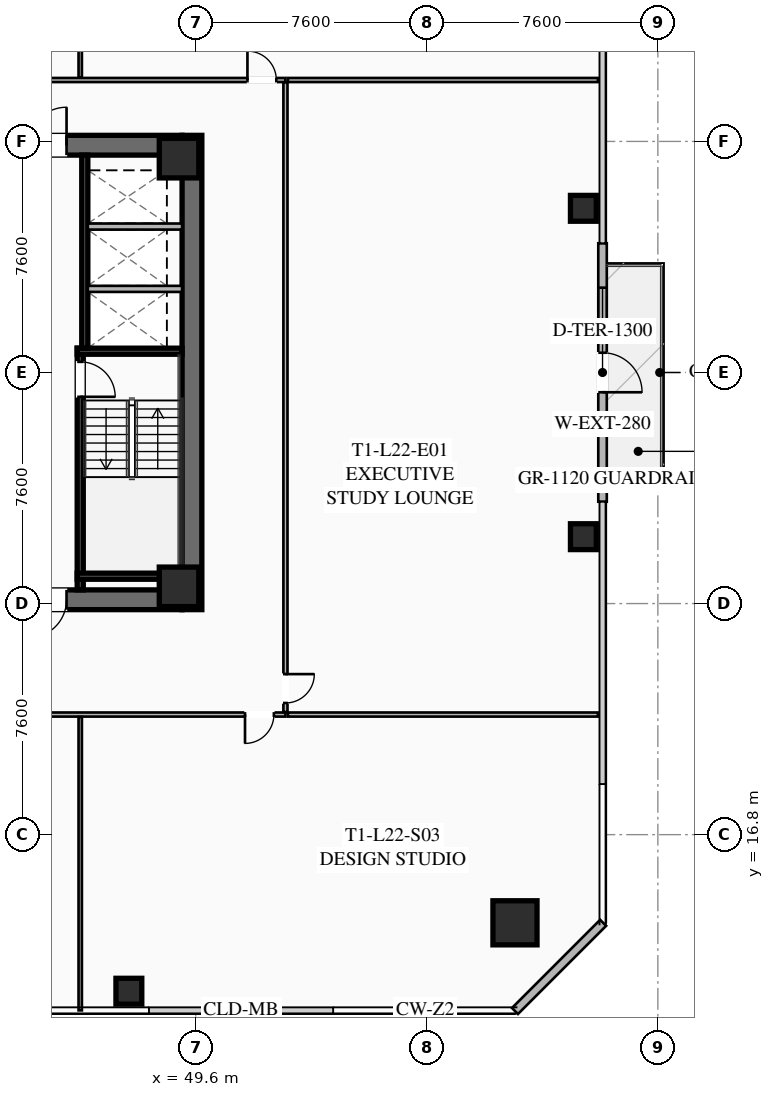
"""IFC4 building model, lengths in metres.
Left out: names, types, materials, properties, quantities, classifications, styles, units other than length and angle.
Written with IfcOpenShell. Run it as: python <this file> out.ifc"""

import sys

from ifc_helpers import new_model, si_unit, direction, frame, frame_2d, origin, origin_2d, place, context, subcontext, project, spatial, rectangle, hollow_rectangle, extrude, element, fill, save


model = new_model("IFC4")
c1 = context("Model", 3, precision=1e-05, world=origin(), true_north=direction((0.0, 1.0)))
c2 = subcontext(c1, "Body", "Model", "MODEL_VIEW")
j1 = project(units=[si_unit("LENGTHUNIT", "METRE"), si_unit("PLANEANGLEUNIT", "RADIAN")], contexts=[c1])
p1 = place(None, origin())
s1 = spatial("IfcSite", under=j1, at=p1, CompositionType="ELEMENT")
p2 = place(p1, origin())
s2 = spatial("IfcBuilding", under=s1, at=p2, CompositionType="ELEMENT")
p3 = place(p2, frame((0.0, 0.0, 84.95)))
s3 = spatial("IfcBuildingStorey", under=s2, at=p3, CompositionType="ELEMENT", Elevation=84.95)
p4 = place(p3, frame((49.475, 39.8, 0.0), z_axis=(0.0, 0.0, 1.0), x_axis=(0.0, -1.0, 0.0)))
e1 = element("IfcWall", 1, at=p4, inside=s3, PredefinedType="SHEAR", context=c2, shape_type="SweptSolid", body=[
    extrude(rectangle(XDim=15.6, YDim=0.65, at=frame_2d((7.8, 0.0))), origin(), (0.0, 0.0, 1.0), 3.55),
])
p5 = place(p3, frame((49.15, 24.525, 0.0), z_axis=(0.0, 0.0, 1.0), x_axis=(-1.0, 0.0, 0.0)))
e2 = element("IfcWall", 2, at=p5, inside=s3, PredefinedType="SHEAR", context=c2, shape_type="SweptSolid", body=[
    extrude(rectangle(XDim=14.3, YDim=0.65, at=frame_2d((7.15, 0.0))), origin(), (0.0, 0.0, 1.0), 3.55),
])
p6 = place(p5, frame((8.85, 0.0, 0.0)))
e3 = element("IfcOpeningElement", 3, at=p6, cuts=e2, PredefinedType="OPENING", context=c2, shape_type="SweptSolid", body=[
    extrude(rectangle(XDim=1.25, YDim=2.25, at=frame_2d((0.625, 1.125))), frame((0.0, 0.335, 0.0), z_axis=(0.0, -1.0, 0.0), x_axis=(1.0, 0.0, 0.0)), (0.0, 0.0, 1.0), 0.67),
])
p7 = place(p5, frame((3.8, 0.0, 0.0)))
e4 = element("IfcOpeningElement", 4, at=p7, cuts=e2, PredefinedType="OPENING", context=c2, shape_type="SweptSolid", body=[
    extrude(rectangle(XDim=1.25, YDim=2.25, at=frame_2d((0.625, 1.125))), frame((0.0, 0.335, 0.0), z_axis=(0.0, -1.0, 0.0), x_axis=(1.0, 0.0, 0.0)), (0.0, 0.0, 1.0), 0.67),
])
p8 = place(p3, frame((34.85, 39.475, 0.0), z_axis=(0.0, 0.0, 1.0), x_axis=(1.0, 0.0, 0.0)))
e5 = element("IfcWall", 5, at=p8, inside=s3, PredefinedType="SHEAR", context=c2, shape_type="SweptSolid", body=[
    extrude(rectangle(XDim=14.3, YDim=0.65, at=frame_2d((7.15, 0.0))), origin(), (0.0, 0.0, 1.0), 3.55),
])
p9 = place(p8, frame((4.2, 0.0, 0.0)))
e6 = element("IfcOpeningElement", 6, at=p9, cuts=e5, PredefinedType="OPENING", context=c2, shape_type="SweptSolid", body=[
    extrude(rectangle(XDim=1.25, YDim=2.25, at=frame_2d((0.625, 1.125))), frame((0.0, 0.335, 0.0), z_axis=(0.0, -1.0, 0.0), x_axis=(1.0, 0.0, 0.0)), (0.0, 0.0, 1.0), 0.67),
])
p10 = place(p8, frame((9.25, 0.0, 0.0)))
e7 = element("IfcOpeningElement", 7, at=p10, cuts=e5, PredefinedType="OPENING", context=c2, shape_type="SweptSolid", body=[
    extrude(rectangle(XDim=1.25, YDim=2.25, at=frame_2d((0.625, 1.125))), frame((0.0, 0.335, 0.0), z_axis=(0.0, -1.0, 0.0), x_axis=(1.0, 0.0, 0.0)), (0.0, 0.0, 1.0), 0.67),
])
for number, where, z_axis, x_axis in (
    (8, (49.05, 24.95, 0.0), (0.0, 0.0, 1.0), (1.0, 0.0, 0.0)),
    (9, (49.05, 39.05, 0.0), (0.0, 0.0, 1.0), (1.0, 0.0, 0.0)),
):
    element("IfcColumn", number, at=place(p3, frame(where, z_axis=z_axis, x_axis=x_axis)), inside=s3, PredefinedType="COLUMN", context=c2, shape_type="SweptSolid", body=[
        extrude(hollow_rectangle(XDim=1.3, YDim=1.3, WallThickness=0.05, at=origin_2d()), origin(), (0.0, 0.0, 1.0), 3.35),
    ])
p11 = place(p3, frame((60.1, 13.9, 0.0), z_axis=(0.0, 0.0, 1.0), x_axis=(1.0, 0.0, 0.0)))
e10 = element("IfcColumn", 10, at=p11, inside=s3, PredefinedType="COLUMN", context=c2, shape_type="SweptSolid", body=[
    extrude(hollow_rectangle(XDim=1.45, YDim=1.45, WallThickness=0.055, at=origin_2d()), origin(), (0.0, 0.0, 1.0), 3.35),
])
for number, where, z_axis, x_axis in (
    (11, (47.4, 11.65, 0.0), (0.0, 0.0, 1.0), (1.0, 0.0, 0.0)),
    (12, (62.35, 26.6, 0.0), (0.0, 0.0, 1.0), (1.0, 0.0, 0.0)),
    (13, (62.35, 37.4, 0.0), (0.0, 0.0, 1.0), (1.0, 0.0, 0.0)),
):
    element("IfcColumn", number, at=place(p3, frame(where, z_axis=z_axis, x_axis=x_axis)), inside=s3, PredefinedType="COLUMN", context=c2, shape_type="SweptSolid", body=[
        extrude(hollow_rectangle(XDim=0.85, YDim=0.85, WallThickness=0.035, at=origin_2d()), origin(), (0.0, 0.0, 1.0), 3.35),
    ])
p12 = place(p3, frame((62.98, 36.25, 0.0), z_axis=(0.0, 0.0, 1.0), x_axis=(0.0, -1.0, 0.0)))
e14 = element("IfcWall", 14, at=p12, inside=s3, PredefinedType="SOLIDWALL", context=c2, shape_type="SweptSolid", body=[
    extrude(rectangle(XDim=8.5, YDim=0.28, at=frame_2d((4.25, 0.0))), origin(), (0.0, 0.0, 1.0), 3.35),
])
p13 = place(p12, frame((3.6, 0.0, 0.0)))
e15 = element("IfcOpeningElement", 15, at=p13, cuts=e14, PredefinedType="OPENING", context=c2, shape_type="SweptSolid", body=[
    extrude(rectangle(XDim=1.3, YDim=2.15, at=frame_2d((0.65, 1.075))), frame((0.0, 0.15, 0.0), z_axis=(0.0, -1.0, 0.0), x_axis=(1.0, 0.0, 0.0)), (0.0, 0.0, 1.0), 0.3),
])
p14 = place(p12, frame((1.46, 0.0, 0.85)))
e16 = element("IfcOpeningElement", 16, at=p14, cuts=e14, PredefinedType="OPENING", context=c2, shape_type="SweptSolid", body=[
    extrude(rectangle(XDim=1.8, YDim=1.92, at=frame_2d((0.9, 0.96))), frame((0.0, 0.15, 0.0), z_axis=(0.0, -1.0, 0.0), x_axis=(1.0, 0.0, 0.0)), (0.0, 0.0, 1.0), 0.3),
])
p15 = place(p3, frame((63.0, 13.9, 0.0), z_axis=(0.0, 0.0, 1.0), x_axis=(-0.707106781187, -0.707106781187, 0.0)))
e17 = element("IfcWall", 17, at=p15, inside=s3, PredefinedType="SOLIDWALL", context=c2, shape_type="SweptSolid", body=[
    extrude(rectangle(XDim=4.101, YDim=0.28, at=frame_2d((2.051, 0.0))), origin(), (0.0, 0.0, 1.0), 3.35),
])
p16 = place(p3, frame((45.8, 32.8, 0.0), z_axis=(0.0, 0.0, 1.0), x_axis=(0.0, -1.0, 0.0)))
e18 = element("IfcWall", 18, at=p16, inside=s3, PredefinedType="SHEAR", context=c2, shape_type="SweptSolid", body=[
    extrude(rectangle(XDim=7.95, YDim=0.2, at=frame_2d((3.975, 0.0))), origin(), (0.0, 0.0, 1.0), 3.35),
])
p17 = place(p16, frame((0.45, 0.0, 0.0)))
e19 = element("IfcOpeningElement", 19, at=p17, cuts=e18, PredefinedType="OPENING", context=c2, shape_type="SweptSolid", body=[
    extrude(rectangle(XDim=1.15, YDim=2.2, at=frame_2d((0.575, 1.1))), frame((0.0, 0.11, 0.0), z_axis=(0.0, -1.0, 0.0), x_axis=(1.0, 0.0, 0.0)), (0.0, 0.0, 1.0), 0.22),
])
for number, where, z_axis, x_axis in (
    (20, (45.7, 32.7, 0.0), (0.0, 0.0, 1.0), (1.0, 0.0, 0.0)),
    (21, (45.7, 25.3, 0.0), (0.0, 0.0, 1.0), (1.0, 0.0, 0.0)),
):
    element("IfcWall", number, at=place(p3, frame(where, z_axis=z_axis, x_axis=x_axis)), inside=s3, PredefinedType="SHEAR", context=c2, shape_type="SweptSolid", body=[
        extrude(rectangle(XDim=3.45, YDim=0.2, at=frame_2d((1.725, 0.0))), origin(), (0.0, 0.0, 1.0), 3.35),
    ])
p18 = place(p3, frame((45.95, 39.15, 0.0), z_axis=(0.0, 0.0, 1.0), x_axis=(0.0, -1.0, 0.0)))
e22 = element("IfcWall", 22, at=p18, inside=s3, PredefinedType="SHEAR", context=c2, shape_type="SweptSolid", body=[
    extrude(rectangle(XDim=6.35, YDim=0.2, at=frame_2d((3.175, 0.0))), origin(), (0.0, 0.0, 1.0), 3.35),
])
for number, where, z_axis, x_axis in (
    (23, (46.05, 34.75, 0.0), (0.0, 0.0, 1.0), (1.0, 0.0, 0.0)),
    (24, (46.05, 36.8, 0.0), (0.0, 0.0, 1.0), (1.0, 0.0, 0.0)),
):
    element("IfcWall", number, at=place(p3, frame(where, z_axis=z_axis, x_axis=x_axis)), inside=s3, PredefinedType="SOLIDWALL", context=c2, shape_type="SweptSolid", body=[
        extrude(rectangle(XDim=3.1, YDim=0.2, at=frame_2d((1.55, 0.0))), origin(), (0.0, 0.0, 1.0), 3.35),
    ])
p19 = place(p3, frame((24.05, 41.62, 0.0), z_axis=(0.0, 0.0, 1.0), x_axis=(1.0, 0.0, 0.0)))
e25 = element("IfcWall", 25, at=p19, inside=s3, PredefinedType="PARTITIONING", context=c2, shape_type="SweptSolid", body=[
    extrude(rectangle(XDim=28.5, YDim=0.135, at=frame_2d((14.25, 0.0))), origin(), (0.0, 0.0, 1.0), 2.703),
])
p20 = place(p19, frame((0.3, 0.0, 0.0)))
e26 = element("IfcOpeningElement", 26, at=p20, cuts=e25, PredefinedType="OPENING", context=c2, shape_type="SweptSolid", body=[
    extrude(rectangle(XDim=0.95, YDim=2.05, at=frame_2d((0.475, 1.025))), frame((0.0, 0.077, 0.0), z_axis=(0.0, -1.0, 0.0), x_axis=(1.0, 0.0, 0.0)), (0.0, 0.0, 1.0), 0.155),
])
p21 = place(p19, frame((17.599, 0.0, 0.0)))
e27 = element("IfcOpeningElement", 27, at=p21, cuts=e25, PredefinedType="OPENING", context=c2, shape_type="SweptSolid", body=[
    extrude(rectangle(XDim=0.95, YDim=2.05, at=frame_2d((0.475, 1.025))), frame((0.0, 0.077, 0.0), z_axis=(0.0, -1.0, 0.0), x_axis=(1.0, 0.0, 0.0)), (0.0, 0.0, 1.0), 0.155),
])
p22 = place(p19, frame((27.25, 0.0, 0.0)))
e28 = element("IfcOpeningElement", 28, at=p22, cuts=e25, PredefinedType="OPENING", context=c2, shape_type="SweptSolid", body=[
    extrude(rectangle(XDim=0.95, YDim=2.05, at=frame_2d((0.475, 1.025))), frame((0.0, 0.077, 0.0), z_axis=(0.0, -1.0, 0.0), x_axis=(1.0, 0.0, 0.0)), (0.0, 0.0, 1.0), 0.155),
])
p23 = place(p3, frame((45.8, 41.7, 0.0), z_axis=(0.0, 0.0, 1.0), x_axis=(0.0, 1.0, 0.0)))
e29 = element("IfcWall", 29, at=p23, inside=s3, PredefinedType="PARTITIONING", context=c2, shape_type="SweptSolid", body=[
    extrude(rectangle(XDim=11.28, YDim=0.11, at=frame_2d((5.64, 0.0))), origin(), (0.0, 0.0, 1.0), 2.703),
])
p24 = place(p3, frame((52.55, 20.75, 0.0), z_axis=(0.0, 0.0, 1.0), x_axis=(-1.0, 0.0, 0.0)))
e30 = element("IfcWall", 30, at=p24, inside=s3, PredefinedType="PARTITIONING", context=c2, shape_type="SweptSolid", body=[
    extrude(rectangle(XDim=28.5, YDim=0.135, at=frame_2d((14.25, 0.0))), origin(), (0.0, 0.0, 1.0), 2.703),
])
p25 = place(p24, frame((27.17, 0.0, 0.0)))
e31 = element("IfcOpeningElement", 31, at=p25, cuts=e30, PredefinedType="OPENING", context=c2, shape_type="SweptSolid", body=[
    extrude(rectangle(XDim=0.95, YDim=2.05, at=frame_2d((0.475, 1.025))), frame((0.0, 0.077, 0.0), z_axis=(0.0, -1.0, 0.0), x_axis=(1.0, 0.0, 0.0)), (0.0, 0.0, 1.0), 0.155),
])
p26 = place(p24, frame((9.975, 0.0, 0.0)))
e32 = element("IfcOpeningElement", 32, at=p26, cuts=e30, PredefinedType="OPENING", context=c2, shape_type="SweptSolid", body=[
    extrude(rectangle(XDim=0.95, YDim=2.05, at=frame_2d((0.475, 1.025))), frame((0.0, 0.077, 0.0), z_axis=(0.0, -1.0, 0.0), x_axis=(1.0, 0.0, 0.0)), (0.0, 0.0, 1.0), 0.155),
])
p27 = place(p24, frame((0.38, 0.0, 0.0)))
e33 = element("IfcOpeningElement", 33, at=p27, cuts=e30, PredefinedType="OPENING", context=c2, shape_type="SweptSolid", body=[
    extrude(rectangle(XDim=0.95, YDim=2.05, at=frame_2d((0.475, 1.025))), frame((0.0, 0.077, 0.0), z_axis=(0.0, -1.0, 0.0), x_axis=(1.0, 0.0, 0.0)), (0.0, 0.0, 1.0), 0.155),
])
p28 = place(p3, frame((45.8, 11.02, 0.0), z_axis=(0.0, 0.0, 1.0), x_axis=(0.0, 1.0, 0.0)))
e34 = element("IfcWall", 34, at=p28, inside=s3, PredefinedType="PARTITIONING", context=c2, shape_type="SweptSolid", body=[
    extrude(rectangle(XDim=9.65, YDim=0.11, at=frame_2d((4.825, 0.0))), origin(), (0.0, 0.0, 1.0), 2.703),
])
p29 = place(p3, frame((52.55, 41.54, 0.0), z_axis=(0.0, 0.0, 1.0), x_axis=(0.0, -1.0, 0.0)))
e35 = element("IfcWall", 35, at=p29, inside=s3, PredefinedType="PARTITIONING", context=c2, shape_type="SweptSolid", body=[
    extrude(rectangle(XDim=20.71, YDim=0.135, at=frame_2d((10.355, 0.0))), origin(), (0.0, 0.0, 1.0), 2.703),
])
p30 = place(p29, frame((19.46, 0.0, 0.0)))
e36 = element("IfcOpeningElement", 36, at=p30, cuts=e35, PredefinedType="OPENING", context=c2, shape_type="SweptSolid", body=[
    extrude(rectangle(XDim=0.95, YDim=2.05, at=frame_2d((0.475, 1.025))), frame((0.0, 0.077, 0.0), z_axis=(0.0, -1.0, 0.0), x_axis=(1.0, 0.0, 0.0)), (0.0, 0.0, 1.0), 0.155),
])
for number, where, z_axis, x_axis in (
    (37, (62.83, 41.62, 0.0), (0.0, 0.0, 1.0), (-1.0, 0.0, 0.0)),
    (38, (52.63, 20.75, 0.0), (0.0, 0.0, 1.0), (1.0, 0.0, 0.0)),
):
    element("IfcWall", number, at=place(p3, frame(where, z_axis=z_axis, x_axis=x_axis)), inside=s3, PredefinedType="PARTITIONING", context=c2, shape_type="SweptSolid", body=[
        extrude(rectangle(XDim=10.2, YDim=0.135, at=frame_2d((5.1, 0.0))), origin(), (0.0, 0.0, 1.0), 2.703),
    ])
p31 = place(p13, origin())
e39 = element("IfcDoor", 39, at=p31, inside=s3, OperationType="SINGLE_SWING_RIGHT", PredefinedType="DOOR", context=c2, shape_type="SweptSolid", body=[
    extrude(rectangle(XDim=1.3, YDim=2.15, at=frame_2d((0.65, 1.075))), frame((0.0, 0.025, 0.0), z_axis=(0.0, -1.0, 0.0), x_axis=(1.0, 0.0, 0.0)), (0.0, 0.0, 1.0), 0.05),
])
fill(e15, e39)
p32 = place(p14, origin())
e40 = element("IfcWindow", 40, at=p32, inside=s3, PartitioningType="SINGLE_PANEL", PredefinedType="WINDOW", context=c2, shape_type="SweptSolid", body=[
    extrude(rectangle(XDim=1.8, YDim=1.92, at=frame_2d((0.9, 0.96))), frame((0.0, 0.03, 0.0), z_axis=(0.0, -1.0, 0.0), x_axis=(1.0, 0.0, 0.0)), (0.0, 0.0, 1.0), 0.06),
])
fill(e16, e40)
p33 = place(p10, origin())
e41 = element("IfcDoor", 41, at=p33, inside=s3, OperationType="SINGLE_SWING_RIGHT", PredefinedType="DOOR", context=c2, shape_type="SweptSolid", body=[
    extrude(rectangle(XDim=1.25, YDim=2.25, at=frame_2d((0.625, 1.125))), frame((0.0, 0.025, 0.0), z_axis=(0.0, -1.0, 0.0), x_axis=(1.0, 0.0, 0.0)), (0.0, 0.0, 1.0), 0.05),
])
fill(e7, e41)
p34 = place(p7, origin())
e42 = element("IfcDoor", 42, at=p34, inside=s3, OperationType="SINGLE_SWING_RIGHT", PredefinedType="DOOR", context=c2, shape_type="SweptSolid", body=[
    extrude(rectangle(XDim=1.25, YDim=2.25, at=frame_2d((0.625, 1.125))), frame((0.0, 0.025, 0.0), z_axis=(0.0, -1.0, 0.0), x_axis=(1.0, 0.0, 0.0)), (0.0, 0.0, 1.0), 0.05),
])
fill(e4, e42)
p35 = place(p17, origin())
e43 = element("IfcDoor", 43, at=p35, inside=s3, OperationType="SINGLE_SWING_RIGHT", PredefinedType="DOOR", context=c2, shape_type="SweptSolid", body=[
    extrude(rectangle(XDim=1.15, YDim=2.2, at=frame_2d((0.575, 1.1))), frame((0.0, 0.025, 0.0), z_axis=(0.0, -1.0, 0.0), x_axis=(1.0, 0.0, 0.0)), (0.0, 0.0, 1.0), 0.05),
])
fill(e19, e43)
p36 = place(p22, origin())
e44 = element("IfcDoor", 44, at=p36, inside=s3, OperationType="SINGLE_SWING_LEFT", PredefinedType="DOOR", context=c2, shape_type="SweptSolid", body=[
    extrude(rectangle(XDim=0.95, YDim=2.05, at=frame_2d((0.475, 1.025))), frame((0.0, 0.025, 0.0), z_axis=(0.0, -1.0, 0.0), x_axis=(1.0, 0.0, 0.0)), (0.0, 0.0, 1.0), 0.05),
])
fill(e28, e44)
p37 = place(p27, origin())
e45 = element("IfcDoor", 45, at=p37, inside=s3, OperationType="SINGLE_SWING_RIGHT", PredefinedType="DOOR", context=c2, shape_type="SweptSolid", body=[
    extrude(rectangle(XDim=0.95, YDim=2.05, at=frame_2d((0.475, 1.025))), frame((0.0, 0.025, 0.0), z_axis=(0.0, -1.0, 0.0), x_axis=(1.0, 0.0, 0.0)), (0.0, 0.0, 1.0), 0.05),
])
fill(e33, e45)
p38 = place(p30, origin())
e46 = element("IfcDoor", 46, at=p38, inside=s3, OperationType="SINGLE_SWING_LEFT", PredefinedType="DOOR", context=c2, shape_type="SweptSolid", body=[
    extrude(rectangle(XDim=0.95, YDim=2.05, at=frame_2d((0.475, 1.025))), frame((0.0, 0.025, 0.0), z_axis=(0.0, -1.0, 0.0), x_axis=(1.0, 0.0, 0.0)), (0.0, 0.0, 1.0), 0.05),
])
fill(e36, e46)
save(model, sys.argv[1])
